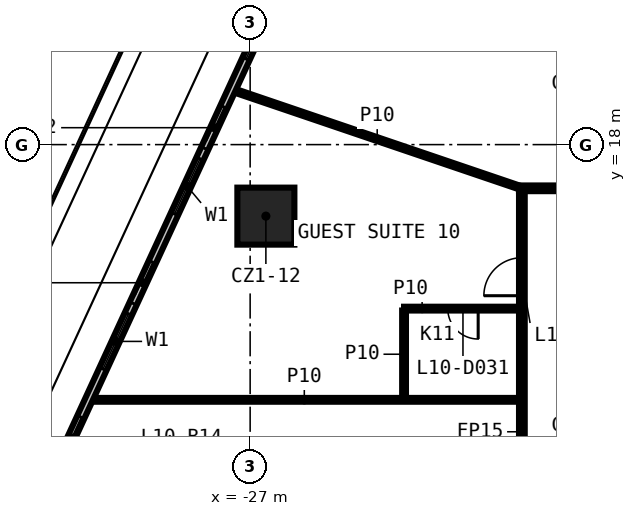
"""IFC4 building model, lengths in metres.
Left out: names, types, materials, properties, quantities, classifications, styles, units other than length and angle.
Written with IfcOpenShell. Run it as: python <this file> out.ifc"""

import sys

from ifc_helpers import new_model, si_unit, direction, frame, frame_2d, origin, origin_2d, place, context, subcontext, project, spatial, rectangle, extrude, element, fill, save


model = new_model("IFC4")
c1 = context("Model", 3, precision=1e-05, world=origin(), true_north=direction((0.0, 1.0)))
c2 = subcontext(c1, "Body", "Model", "MODEL_VIEW")
j1 = project(units=[si_unit("LENGTHUNIT", "METRE"), si_unit("PLANEANGLEUNIT", "RADIAN")], contexts=[c1])
p1 = place(None, origin())
s1 = spatial("IfcSite", under=j1, at=p1, CompositionType="ELEMENT")
p2 = place(p1, origin())
s2 = spatial("IfcBuilding", under=s1, at=p2, CompositionType="ELEMENT")
p3 = place(p2, frame((0.0, 0.0, 58.8)))
s3 = spatial("IfcBuildingStorey", under=s2, at=p3, CompositionType="ELEMENT", Elevation=58.8)
p4 = place(p3, frame((-26.586, 16.118, 0.0), z_axis=(0.0, 0.0, 1.0), x_axis=(1.0, 0.0, 0.0)))
e1 = element("IfcColumn", 1, at=p4, inside=s3, PredefinedType="COLUMN", context=c2, shape_type="SweptSolid", body=[
    extrude(rectangle(XDim=1.5, YDim=1.5, at=origin_2d()), origin(), (0.0, 0.0, 1.0), 3.3),
])
p5 = place(p3, frame((-31.225, 11.284, 0.0), z_axis=(0.0, 0.0, 1.0), x_axis=(1.0, 0.0, 0.0)))
e2 = element("IfcWall", 2, at=p5, inside=s3, PredefinedType="PARTITIONING", context=c2, shape_type="SweptSolid", body=[
    extrude(rectangle(XDim=11.3, YDim=0.1, at=frame_2d((5.65, 0.0))), origin(), (0.0, 0.0, 1.0), 3.3),
])
p6 = place(p3, frame((-19.925, 13.684, 0.0), z_axis=(0.0, 0.0, 1.0), x_axis=(-1.0, 0.0, 0.0)))
e3 = element("IfcWall", 3, at=p6, inside=s3, PredefinedType="PARTITIONING", context=c2, shape_type="SweptSolid", body=[
    extrude(rectangle(XDim=3.025, YDim=0.1, at=frame_2d((1.512, 0.0))), origin(), (0.0, 0.0, 1.0), 3.3),
])
p7 = place(p6, frame((1.075, 0.0, 0.0)))
e4 = element("IfcOpeningElement", 4, at=p7, cuts=e3, PredefinedType="OPENING", context=c2, shape_type="SweptSolid", body=[
    extrude(rectangle(XDim=0.8, YDim=2.1, at=frame_2d((0.4, 1.05))), frame((0.0, 0.06, 0.0), z_axis=(0.0, -1.0, 0.0), x_axis=(1.0, 0.0, 0.0)), (0.0, 0.0, 1.0), 0.12),
])
p8 = place(p3, frame((-19.925, 16.85, 0.0), z_axis=(0.0, 0.0, 1.0), x_axis=(1.0, 0.0, 0.0)))
e5 = element("IfcWall", 5, at=p8, inside=s3, PredefinedType="PARTITIONING", context=c2, shape_type="SweptSolid", body=[
    extrude(rectangle(XDim=39.85, YDim=0.15, at=frame_2d((19.925, 0.0))), origin(), (0.0, 0.0, 1.0), 3.3),
])
p9 = place(p8, frame((31.433, 0.0, 0.0)))
e6 = element("IfcOpeningElement", 6, at=p9, cuts=e5, PredefinedType="OPENING", context=c2, shape_type="SweptSolid", body=[
    extrude(rectangle(XDim=0.9, YDim=2.1, at=frame_2d((0.45, 1.05))), frame((0.0, 0.085, 0.0), z_axis=(0.0, -1.0, 0.0), x_axis=(1.0, 0.0, 0.0)), (0.0, 0.0, 1.0), 0.17),
])
p10 = place(p8, frame((22.043, 0.0, 0.0)))
e7 = element("IfcOpeningElement", 7, at=p10, cuts=e5, PredefinedType="OPENING", context=c2, shape_type="SweptSolid", body=[
    extrude(rectangle(XDim=0.9, YDim=2.1, at=frame_2d((0.45, 1.05))), frame((0.0, 0.085, 0.0), z_axis=(0.0, -1.0, 0.0), x_axis=(1.0, 0.0, 0.0)), (0.0, 0.0, 1.0), 0.17),
])
p11 = place(p8, frame((16.957, 0.0, 0.0)))
e8 = element("IfcOpeningElement", 8, at=p11, cuts=e5, PredefinedType="OPENING", context=c2, shape_type="SweptSolid", body=[
    extrude(rectangle(XDim=0.9, YDim=2.1, at=frame_2d((0.45, 1.05))), frame((0.0, 0.085, 0.0), z_axis=(0.0, -1.0, 0.0), x_axis=(1.0, 0.0, 0.0)), (0.0, 0.0, 1.0), 0.17),
])
p12 = place(p8, frame((13.572, 0.0, 0.0)))
e9 = element("IfcOpeningElement", 9, at=p12, cuts=e5, PredefinedType="OPENING", context=c2, shape_type="SweptSolid", body=[
    extrude(rectangle(XDim=0.9, YDim=2.1, at=frame_2d((0.45, 1.05))), frame((0.0, 0.085, 0.0), z_axis=(0.0, -1.0, 0.0), x_axis=(1.0, 0.0, 0.0)), (0.0, 0.0, 1.0), 0.17),
])
p13 = place(p8, frame((7.458, 0.0, 0.0)))
e10 = element("IfcOpeningElement", 10, at=p13, cuts=e5, PredefinedType="OPENING", context=c2, shape_type="SweptSolid", body=[
    extrude(rectangle(XDim=1.0, YDim=2.1, at=frame_2d((0.5, 1.05))), frame((0.0, 0.085, 0.0), z_axis=(0.0, -1.0, 0.0), x_axis=(1.0, 0.0, 0.0)), (0.0, 0.0, 1.0), 0.17),
])
p14 = place(p3, frame((-19.85, -16.775, 0.0), z_axis=(0.0, 0.0, 1.0), x_axis=(0.0, 1.0, 0.0)))
e11 = element("IfcWall", 11, at=p14, inside=s3, PredefinedType="PARTITIONING", context=c2, shape_type="SweptSolid", body=[
    extrude(rectangle(XDim=33.55, YDim=0.15, at=frame_2d((16.775, 0.0))), origin(), (0.0, 0.0, 1.0), 3.3),
])
p15 = place(p14, frame((12.083, 0.0, 0.0)))
e12 = element("IfcOpeningElement", 12, at=p15, cuts=e11, PredefinedType="OPENING", context=c2, shape_type="SweptSolid", body=[
    extrude(rectangle(XDim=1.0, YDim=2.1, at=frame_2d((0.5, 1.05))), frame((0.0, 0.085, 0.0), z_axis=(0.0, -1.0, 0.0), x_axis=(1.0, 0.0, 0.0)), (0.0, 0.0, 1.0), 0.17),
])
p16 = place(p14, frame((10.128, 0.0, 0.0)))
e13 = element("IfcOpeningElement", 13, at=p16, cuts=e11, PredefinedType="OPENING", context=c2, shape_type="SweptSolid", body=[
    extrude(rectangle(XDim=1.0, YDim=2.1, at=frame_2d((0.5, 1.05))), frame((0.0, 0.085, 0.0), z_axis=(0.0, -1.0, 0.0), x_axis=(1.0, 0.0, 0.0)), (0.0, 0.0, 1.0), 0.17),
])
p17 = place(p14, frame((3.259, 0.0, 0.0)))
e14 = element("IfcOpeningElement", 14, at=p17, cuts=e11, PredefinedType="OPENING", context=c2, shape_type="SweptSolid", body=[
    extrude(rectangle(XDim=0.9, YDim=2.1, at=frame_2d((0.45, 1.05))), frame((0.0, 0.085, 0.0), z_axis=(0.0, -1.0, 0.0), x_axis=(1.0, 0.0, 0.0)), (0.0, 0.0, 1.0), 0.17),
])
p18 = place(p14, frame((30.799, 0.0, 0.0)))
e15 = element("IfcOpeningElement", 15, at=p18, cuts=e11, PredefinedType="OPENING", context=c2, shape_type="SweptSolid", body=[
    extrude(rectangle(XDim=1.0, YDim=2.1, at=frame_2d((0.5, 1.05))), frame((0.0, 0.085, 0.0), z_axis=(0.0, -1.0, 0.0), x_axis=(1.0, 0.0, 0.0)), (0.0, 0.0, 1.0), 0.17),
])
p19 = place(p14, frame((22.638, 0.0, 0.0)))
e16 = element("IfcOpeningElement", 16, at=p19, cuts=e11, PredefinedType="OPENING", context=c2, shape_type="SweptSolid", body=[
    extrude(rectangle(XDim=1.0, YDim=2.1, at=frame_2d((0.5, 1.05))), frame((0.0, 0.085, 0.0), z_axis=(0.0, -1.0, 0.0), x_axis=(1.0, 0.0, 0.0)), (0.0, 0.0, 1.0), 0.17),
])
p20 = place(p14, frame((18.681, 0.0, 0.0)))
e17 = element("IfcOpeningElement", 17, at=p20, cuts=e11, PredefinedType="OPENING", context=c2, shape_type="SweptSolid", body=[
    extrude(rectangle(XDim=0.9, YDim=2.1, at=frame_2d((0.45, 1.05))), frame((0.0, 0.085, 0.0), z_axis=(0.0, -1.0, 0.0), x_axis=(1.0, 0.0, 0.0)), (0.0, 0.0, 1.0), 0.17),
])
p21 = place(p3, frame((-22.95, 11.334, 0.0), z_axis=(0.0, 0.0, 1.0), x_axis=(0.0, 1.0, 0.0)))
e18 = element("IfcWall", 18, at=p21, inside=s3, PredefinedType="PARTITIONING", context=c2, shape_type="SweptSolid", body=[
    extrude(rectangle(XDim=2.3, YDim=0.1, at=frame_2d((1.15, 0.0))), origin(), (0.0, 0.0, 1.0), 3.3),
])
p22 = place(p3, frame((-27.464, 19.438, 0.0), z_axis=(0.0, 0.0, 1.0), x_axis=(0.946811969778, -0.321787342643, 0.0)))
e19 = element("IfcWall", 19, at=p22, inside=s3, PredefinedType="PARTITIONING", context=c2, shape_type="SweptSolid", body=[
    extrude(rectangle(XDim=8.042, YDim=0.1, at=frame_2d((4.021, 0.0))), origin(), (0.0, 0.0, 1.0), 3.3),
])
p23 = place(p3, frame((-25.601, 23.524, 0.0), z_axis=(0.0, 0.0, 1.0), x_axis=(-0.418809499218, -0.908074117771, 0.0)))
e20 = element("IfcWall", 20, at=p23, inside=s3, PredefinedType="SOLIDWALL", context=c2, shape_type="SweptSolid", body=[
    extrude(rectangle(XDim=26.959, YDim=0.2, at=frame_2d((13.479, 0.0))), origin(), (0.0, 0.0, 1.0), 3.3),
])
p24 = place(p23, frame((2.0, 0.0, 0.6)))
e21 = element("IfcOpeningElement", 21, at=p24, cuts=e20, PredefinedType="OPENING", context=c2, shape_type="SweptSolid", body=[
    extrude(rectangle(XDim=1.6, YDim=2.4, at=frame_2d((0.8, 1.2))), frame((0.0, 0.11, 0.0), z_axis=(0.0, -1.0, 0.0), x_axis=(1.0, 0.0, 0.0)), (0.0, 0.0, 1.0), 0.22),
])
p25 = place(p23, frame((0.5, 0.0, 0.0)))
e22 = element("IfcOpeningElement", 22, at=p25, cuts=e20, PredefinedType="OPENING", context=c2, shape_type="SweptSolid", body=[
    extrude(rectangle(XDim=1.2, YDim=2.4, at=frame_2d((0.6, 1.2))), frame((0.0, 0.11, 0.0), z_axis=(0.0, -1.0, 0.0), x_axis=(1.0, 0.0, 0.0)), (0.0, 0.0, 1.0), 0.22),
])
p26 = place(p23, frame((6.493, 0.0, 0.6)))
e23 = element("IfcOpeningElement", 23, at=p26, cuts=e20, PredefinedType="OPENING", context=c2, shape_type="SweptSolid", body=[
    extrude(rectangle(XDim=1.6, YDim=2.4, at=frame_2d((0.8, 1.2))), frame((0.0, 0.11, 0.0), z_axis=(0.0, -1.0, 0.0), x_axis=(1.0, 0.0, 0.0)), (0.0, 0.0, 1.0), 0.22),
])
p27 = place(p23, frame((4.993, 0.0, 0.0)))
e24 = element("IfcOpeningElement", 24, at=p27, cuts=e20, PredefinedType="OPENING", context=c2, shape_type="SweptSolid", body=[
    extrude(rectangle(XDim=1.2, YDim=2.4, at=frame_2d((0.6, 1.2))), frame((0.0, 0.11, 0.0), z_axis=(0.0, -1.0, 0.0), x_axis=(1.0, 0.0, 0.0)), (0.0, 0.0, 1.0), 0.22),
])
p28 = place(p23, frame((10.987, 0.0, 0.6)))
e25 = element("IfcOpeningElement", 25, at=p28, cuts=e20, PredefinedType="OPENING", context=c2, shape_type="SweptSolid", body=[
    extrude(rectangle(XDim=1.6, YDim=2.4, at=frame_2d((0.8, 1.2))), frame((0.0, 0.11, 0.0), z_axis=(0.0, -1.0, 0.0), x_axis=(1.0, 0.0, 0.0)), (0.0, 0.0, 1.0), 0.22),
])
p29 = place(p23, frame((9.487, 0.0, 0.0)))
e26 = element("IfcOpeningElement", 26, at=p29, cuts=e20, PredefinedType="OPENING", context=c2, shape_type="SweptSolid", body=[
    extrude(rectangle(XDim=1.2, YDim=2.4, at=frame_2d((0.6, 1.2))), frame((0.0, 0.11, 0.0), z_axis=(0.0, -1.0, 0.0), x_axis=(1.0, 0.0, 0.0)), (0.0, 0.0, 1.0), 0.22),
])
p30 = place(p23, frame((15.48, 0.0, 0.6)))
e27 = element("IfcOpeningElement", 27, at=p30, cuts=e20, PredefinedType="OPENING", context=c2, shape_type="SweptSolid", body=[
    extrude(rectangle(XDim=1.6, YDim=2.4, at=frame_2d((0.8, 1.2))), frame((0.0, 0.11, 0.0), z_axis=(0.0, -1.0, 0.0), x_axis=(1.0, 0.0, 0.0)), (0.0, 0.0, 1.0), 0.22),
])
p31 = place(p23, frame((13.98, 0.0, 0.0)))
e28 = element("IfcOpeningElement", 28, at=p31, cuts=e20, PredefinedType="OPENING", context=c2, shape_type="SweptSolid", body=[
    extrude(rectangle(XDim=1.2, YDim=2.4, at=frame_2d((0.6, 1.2))), frame((0.0, 0.11, 0.0), z_axis=(0.0, -1.0, 0.0), x_axis=(1.0, 0.0, 0.0)), (0.0, 0.0, 1.0), 0.22),
])
p32 = place(p23, frame((19.973, 0.0, 0.6)))
e29 = element("IfcOpeningElement", 29, at=p32, cuts=e20, PredefinedType="OPENING", context=c2, shape_type="SweptSolid", body=[
    extrude(rectangle(XDim=1.6, YDim=2.4, at=frame_2d((0.8, 1.2))), frame((0.0, 0.11, 0.0), z_axis=(0.0, -1.0, 0.0), x_axis=(1.0, 0.0, 0.0)), (0.0, 0.0, 1.0), 0.22),
])
p33 = place(p23, frame((18.473, 0.0, 0.0)))
e30 = element("IfcOpeningElement", 30, at=p33, cuts=e20, PredefinedType="OPENING", context=c2, shape_type="SweptSolid", body=[
    extrude(rectangle(XDim=1.2, YDim=2.4, at=frame_2d((0.6, 1.2))), frame((0.0, 0.11, 0.0), z_axis=(0.0, -1.0, 0.0), x_axis=(1.0, 0.0, 0.0)), (0.0, 0.0, 1.0), 0.22),
])
p34 = place(p23, frame((24.466, 0.0, 0.6)))
e31 = element("IfcOpeningElement", 31, at=p34, cuts=e20, PredefinedType="OPENING", context=c2, shape_type="SweptSolid", body=[
    extrude(rectangle(XDim=1.6, YDim=2.4, at=frame_2d((0.8, 1.2))), frame((0.0, 0.11, 0.0), z_axis=(0.0, -1.0, 0.0), x_axis=(1.0, 0.0, 0.0)), (0.0, 0.0, 1.0), 0.22),
])
p35 = place(p23, frame((22.966, 0.0, 0.0)))
e32 = element("IfcOpeningElement", 32, at=p35, cuts=e20, PredefinedType="OPENING", context=c2, shape_type="SweptSolid", body=[
    extrude(rectangle(XDim=1.2, YDim=2.4, at=frame_2d((0.6, 1.2))), frame((0.0, 0.11, 0.0), z_axis=(0.0, -1.0, 0.0), x_axis=(1.0, 0.0, 0.0)), (0.0, 0.0, 1.0), 0.22),
])
p36 = place(p7, origin())
e33 = element("IfcDoor", 33, at=p36, inside=s3, OperationType="SINGLE_SWING_RIGHT", PredefinedType="DOOR", context=c2, shape_type="SweptSolid", body=[
    extrude(rectangle(XDim=0.8, YDim=2.1, at=frame_2d((0.4, 1.05))), frame((0.0, 0.025, 0.0), z_axis=(0.0, -1.0, 0.0), x_axis=(1.0, 0.0, 0.0)), (0.0, 0.0, 1.0), 0.05),
])
fill(e4, e33)
p37 = place(p18, origin())
e34 = element("IfcDoor", 34, at=p37, inside=s3, OperationType="SINGLE_SWING_LEFT", PredefinedType="DOOR", context=c2, shape_type="SweptSolid", body=[
    extrude(rectangle(XDim=1.0, YDim=2.1, at=frame_2d((0.5, 1.05))), frame((0.0, 0.025, 0.0), z_axis=(0.0, -1.0, 0.0), x_axis=(1.0, 0.0, 0.0)), (0.0, 0.0, 1.0), 0.05),
])
fill(e15, e34)
p38 = place(p24, origin())
e35 = element("IfcWindow", 35, at=p38, inside=s3, PartitioningType="SINGLE_PANEL", PredefinedType="WINDOW", context=c2, shape_type="SweptSolid", body=[
    extrude(rectangle(XDim=1.6, YDim=2.4, at=frame_2d((0.8, 1.2))), frame((0.0, 0.03, 0.0), z_axis=(0.0, -1.0, 0.0), x_axis=(1.0, 0.0, 0.0)), (0.0, 0.0, 1.0), 0.06),
])
fill(e21, e35)
p39 = place(p26, origin())
e36 = element("IfcWindow", 36, at=p39, inside=s3, PartitioningType="SINGLE_PANEL", PredefinedType="WINDOW", context=c2, shape_type="SweptSolid", body=[
    extrude(rectangle(XDim=1.6, YDim=2.4, at=frame_2d((0.8, 1.2))), frame((0.0, 0.03, 0.0), z_axis=(0.0, -1.0, 0.0), x_axis=(1.0, 0.0, 0.0)), (0.0, 0.0, 1.0), 0.06),
])
fill(e23, e36)
p40 = place(p27, origin())
e37 = element("IfcDoor", 37, at=p40, inside=s3, OperationType="SLIDING_TO_LEFT", PredefinedType="DOOR", context=c2, shape_type="SweptSolid", body=[
    extrude(rectangle(XDim=1.2, YDim=2.4, at=frame_2d((0.6, 1.2))), frame((0.0, 0.025, 0.0), z_axis=(0.0, -1.0, 0.0), x_axis=(1.0, 0.0, 0.0)), (0.0, 0.0, 1.0), 0.05),
])
fill(e24, e37)
p41 = place(p28, origin())
e38 = element("IfcWindow", 38, at=p41, inside=s3, PartitioningType="SINGLE_PANEL", PredefinedType="WINDOW", context=c2, shape_type="SweptSolid", body=[
    extrude(rectangle(XDim=1.6, YDim=2.4, at=frame_2d((0.8, 1.2))), frame((0.0, 0.03, 0.0), z_axis=(0.0, -1.0, 0.0), x_axis=(1.0, 0.0, 0.0)), (0.0, 0.0, 1.0), 0.06),
])
fill(e25, e38)
p42 = place(p29, origin())
e39 = element("IfcDoor", 39, at=p42, inside=s3, OperationType="SLIDING_TO_LEFT", PredefinedType="DOOR", context=c2, shape_type="SweptSolid", body=[
    extrude(rectangle(XDim=1.2, YDim=2.4, at=frame_2d((0.6, 1.2))), frame((0.0, 0.025, 0.0), z_axis=(0.0, -1.0, 0.0), x_axis=(1.0, 0.0, 0.0)), (0.0, 0.0, 1.0), 0.05),
])
fill(e26, e39)
p43 = place(p31, origin())
e40 = element("IfcDoor", 40, at=p43, inside=s3, OperationType="SLIDING_TO_LEFT", PredefinedType="DOOR", context=c2, shape_type="SweptSolid", body=[
    extrude(rectangle(XDim=1.2, YDim=2.4, at=frame_2d((0.6, 1.2))), frame((0.0, 0.025, 0.0), z_axis=(0.0, -1.0, 0.0), x_axis=(1.0, 0.0, 0.0)), (0.0, 0.0, 1.0), 0.05),
])
fill(e28, e40)
save(model, sys.argv[1])
